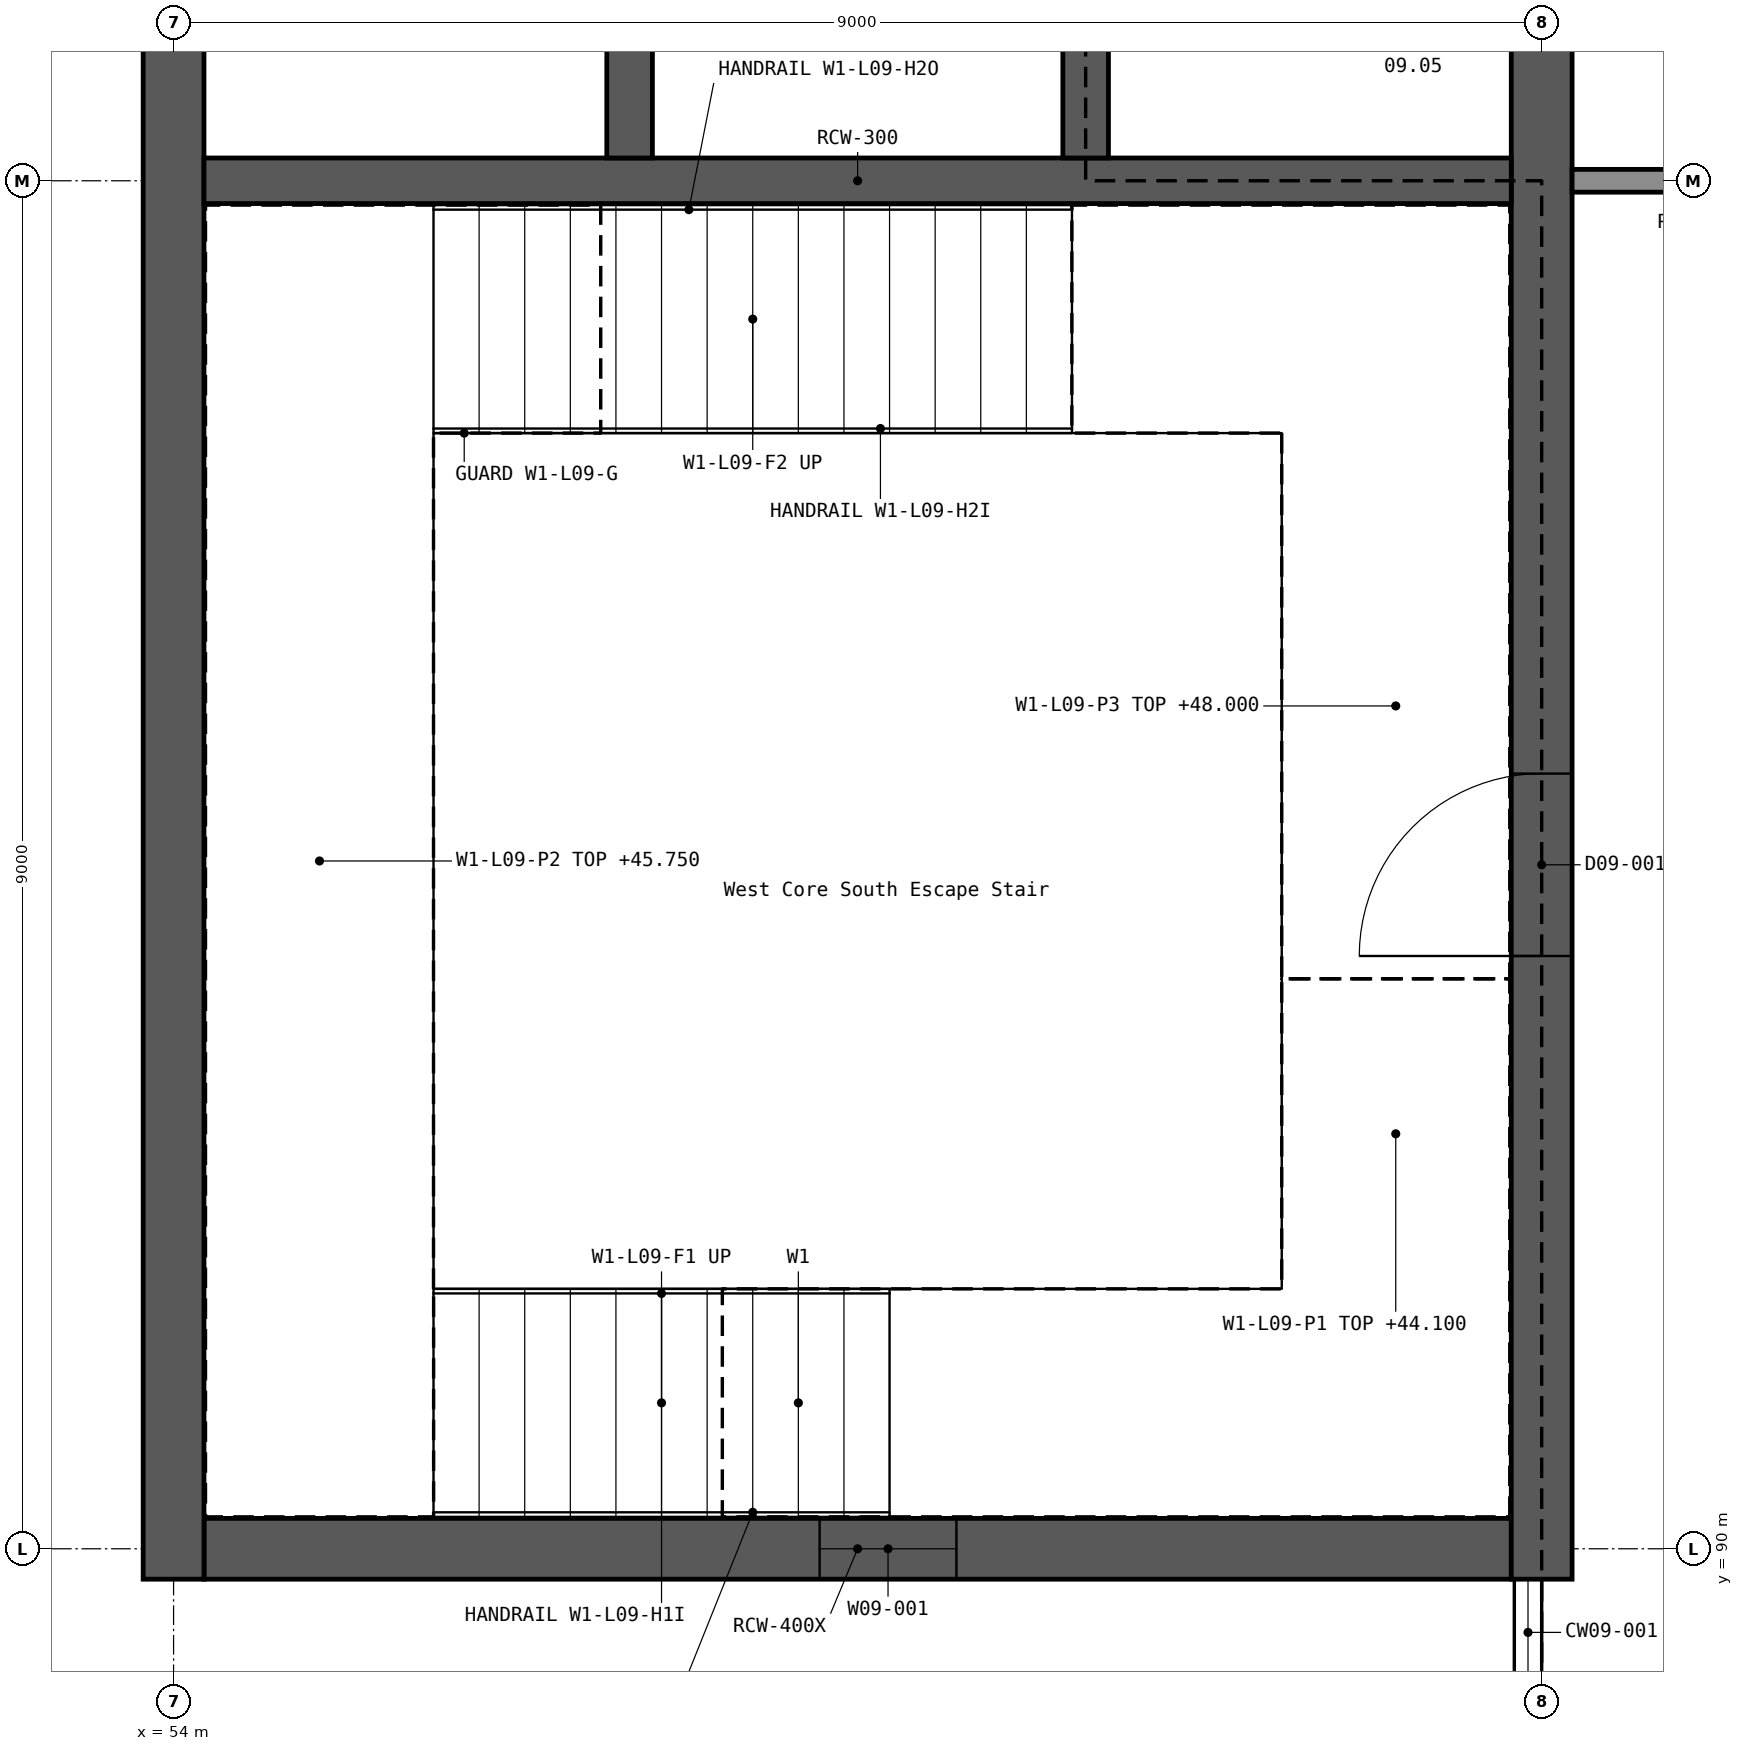
"""IFC4 building model, lengths in metres.
Left out: names, types, materials, properties, quantities, classifications, styles, units other than length and angle.
Written with IfcOpenShell. Run it as: python <this file> out.ifc"""

import sys

from ifc_helpers import new_model, si_unit, direction, frame, frame_2d, origin, place, context, subcontext, project, spatial, rectangle, extrude, element, fill, save


model = new_model("IFC4")
c1 = context("Model", 3, precision=1e-05, world=origin(), true_north=direction((0.0, 1.0)))
c2 = subcontext(c1, "Body", "Model", "MODEL_VIEW")
j1 = project(units=[si_unit("LENGTHUNIT", "METRE"), si_unit("PLANEANGLEUNIT", "RADIAN")], contexts=[c1])
p1 = place(None, origin())
s1 = spatial("IfcSite", under=j1, at=p1, CompositionType="ELEMENT")
p2 = place(p1, origin())
s2 = spatial("IfcBuilding", under=s1, at=p2, CompositionType="ELEMENT")
p3 = place(p2, frame((0.0, 0.0, 44.1)))
s3 = spatial("IfcBuildingStorey", under=s2, at=p3, CompositionType="ELEMENT", Elevation=44.1)
p4 = place(p3, frame((54.2, 90.0, 0.0), z_axis=(0.0, 0.0, 1.0), x_axis=(1.0, 0.0, 0.0)))
e1 = element("IfcWall", 1, at=p4, inside=s3, PredefinedType="SHEAR", context=c2, shape_type="SweptSolid", body=[
    extrude(rectangle(XDim=8.6, YDim=0.4, at=frame_2d((4.3, 0.0))), origin(), (0.0, 0.0, 1.0), 3.9),
])
p5 = place(p4, frame((4.05, 0.0, 1.2)))
e2 = element("IfcOpeningElement", 2, at=p5, cuts=e1, PredefinedType="OPENING", context=c2, shape_type="SweptSolid", body=[
    extrude(rectangle(XDim=0.9, YDim=1.5, at=frame_2d((0.45, 0.75))), frame((0.0, 0.211, 0.0), z_axis=(0.0, -1.0, 0.0), x_axis=(1.0, 0.0, 0.0)), (0.0, 0.0, 1.0), 0.422),
])
p6 = place(p3, frame((54.0, 89.8, 0.0), z_axis=(0.0, 0.0, 1.0), x_axis=(0.0, 1.0, 0.0)))
e3 = element("IfcWall", 3, at=p6, inside=s3, PredefinedType="SHEAR", context=c2, shape_type="SweptSolid", body=[
    extrude(rectangle(XDim=27.4, YDim=0.4, at=frame_2d((13.7, 0.0))), origin(), (0.0, 0.0, 1.0), 3.9),
])
p7 = place(p3, frame((63.0, 89.8, 0.0), z_axis=(0.0, 0.0, 1.0), x_axis=(0.0, 1.0, 0.0)))
e4 = element("IfcWall", 4, at=p7, inside=s3, PredefinedType="SHEAR", context=c2, shape_type="SweptSolid", body=[
    extrude(rectangle(XDim=27.4, YDim=0.4, at=frame_2d((13.7, 0.0))), origin(), (0.0, 0.0, 1.0), 3.9),
])
p8 = place(p7, frame((4.1, 0.0, 0.0)))
e5 = element("IfcOpeningElement", 5, at=p8, cuts=e4, PredefinedType="OPENING", context=c2, shape_type="SweptSolid", body=[
    extrude(rectangle(XDim=1.2, YDim=2.1, at=frame_2d((0.6, 1.05))), frame((0.0, 0.211, 0.0), z_axis=(0.0, -1.0, 0.0), x_axis=(1.0, 0.0, 0.0)), (0.0, 0.0, 1.0), 0.422),
])
p9 = place(p7, frame((22.1, 0.0, 0.0)))
e6 = element("IfcOpeningElement", 6, at=p9, cuts=e4, PredefinedType="OPENING", context=c2, shape_type="SweptSolid", body=[
    extrude(rectangle(XDim=1.2, YDim=2.1, at=frame_2d((0.6, 1.05))), frame((0.0, 0.211, 0.0), z_axis=(0.0, -1.0, 0.0), x_axis=(1.0, 0.0, 0.0)), (0.0, 0.0, 1.0), 0.422),
])
p10 = place(p7, frame((12.5, 0.0, 0.0)))
e7 = element("IfcOpeningElement", 7, at=p10, cuts=e4, PredefinedType="OPENING", context=c2, shape_type="SweptSolid", body=[
    extrude(rectangle(XDim=2.0, YDim=2.1, at=frame_2d((1.0, 1.05))), frame((0.0, 0.211, 0.0), z_axis=(0.0, -1.0, 0.0), x_axis=(1.0, 0.0, 0.0)), (0.0, 0.0, 1.0), 0.422),
])
p11 = place(p3, frame((54.2, 99.0, 0.0), z_axis=(0.0, 0.0, 1.0), x_axis=(1.0, 0.0, 0.0)))
e8 = element("IfcWall", 8, at=p11, inside=s3, PredefinedType="SHEAR", context=c2, shape_type="SweptSolid", body=[
    extrude(rectangle(XDim=8.6, YDim=0.3, at=frame_2d((4.3, 0.0))), origin(), (0.0, 0.0, 1.0), 3.9),
])
p12 = place(p3, frame((57.0, 99.15, 0.0), z_axis=(0.0, 0.0, 1.0), x_axis=(0.0, 1.0, 0.0)))
e9 = element("IfcWall", 9, at=p12, inside=s3, PredefinedType="SHEAR", context=c2, shape_type="SweptSolid", body=[
    extrude(rectangle(XDim=8.7, YDim=0.3, at=frame_2d((4.35, 0.0))), origin(), (0.0, 0.0, 1.0), 3.9),
])
p13 = place(p3, frame((60.0, 99.15, 0.0), z_axis=(0.0, 0.0, 1.0), x_axis=(0.0, 1.0, 0.0)))
e10 = element("IfcWall", 10, at=p13, inside=s3, PredefinedType="SHEAR", context=c2, shape_type="SweptSolid", body=[
    extrude(rectangle(XDim=8.7, YDim=0.3, at=frame_2d((4.35, 0.0))), origin(), (0.0, 0.0, 1.0), 3.9),
])
p14 = place(p13, frame((0.8, 0.0, 0.0)))
e11 = element("IfcOpeningElement", 11, at=p14, cuts=e10, PredefinedType="OPENING", context=c2, shape_type="SweptSolid", body=[
    extrude(rectangle(XDim=1.1, YDim=2.1, at=frame_2d((0.55, 1.05))), frame((0.0, 0.161, 0.0), z_axis=(0.0, -1.0, 0.0), x_axis=(1.0, 0.0, 0.0)), (0.0, 0.0, 1.0), 0.322),
])
p15 = place(p13, frame((3.8, 0.0, 0.0)))
e12 = element("IfcOpeningElement", 12, at=p15, cuts=e10, PredefinedType="OPENING", context=c2, shape_type="SweptSolid", body=[
    extrude(rectangle(XDim=1.1, YDim=2.1, at=frame_2d((0.55, 1.05))), frame((0.0, 0.161, 0.0), z_axis=(0.0, -1.0, 0.0), x_axis=(1.0, 0.0, 0.0)), (0.0, 0.0, 1.0), 0.322),
])
p16 = place(p13, frame((6.8, 0.0, 0.0)))
e13 = element("IfcOpeningElement", 13, at=p16, cuts=e10, PredefinedType="OPENING", context=c2, shape_type="SweptSolid", body=[
    extrude(rectangle(XDim=1.1, YDim=2.1, at=frame_2d((0.55, 1.05))), frame((0.0, 0.161, 0.0), z_axis=(0.0, -1.0, 0.0), x_axis=(1.0, 0.0, 0.0)), (0.0, 0.0, 1.0), 0.322),
])
p17 = place(p3, frame((63.2, 99.0, 0.0), z_axis=(0.0, 0.0, 1.0), x_axis=(1.0, 0.0, 0.0)))
e14 = element("IfcWall", 14, at=p17, inside=s3, PredefinedType="PARTITIONING", context=c2, shape_type="SweptSolid", body=[
    extrude(rectangle(XDim=2.8, YDim=0.15, at=frame_2d((1.4, 0.0))), origin(), (0.0, 0.0, 1.0), 3.22),
])
p18 = place(p17, frame((0.7, 0.0, 0.0)))
e15 = element("IfcOpeningElement", 15, at=p18, cuts=e14, PredefinedType="OPENING", context=c2, shape_type="SweptSolid", body=[
    extrude(rectangle(XDim=1.2, YDim=2.1, at=frame_2d((0.6, 1.05))), frame((0.0, 0.086, 0.0), z_axis=(0.0, -1.0, 0.0), x_axis=(1.0, 0.0, 0.0)), (0.0, 0.0, 1.0), 0.172),
])
p19 = place(p5, origin())
e16 = element("IfcWindow", 16, at=p19, inside=s3, PartitioningType="SINGLE_PANEL", PredefinedType="WINDOW", context=c2, shape_type="SweptSolid", body=[
    extrude(rectangle(XDim=0.9, YDim=1.5, at=frame_2d((0.45, 0.75))), frame((0.0, 0.03, 0.0), z_axis=(0.0, -1.0, 0.0), x_axis=(1.0, 0.0, 0.0)), (0.0, 0.0, 1.0), 0.06),
])
fill(e2, e16)
p20 = place(p8, origin())
e17 = element("IfcDoor", 17, at=p20, inside=s3, OperationType="SINGLE_SWING_LEFT", PredefinedType="DOOR", context=c2, shape_type="SweptSolid", body=[
    extrude(rectangle(XDim=1.2, YDim=2.1, at=frame_2d((0.6, 1.05))), frame((0.0, 0.025, 0.0), z_axis=(0.0, -1.0, 0.0), x_axis=(1.0, 0.0, 0.0)), (0.0, 0.0, 1.0), 0.05),
])
fill(e5, e17)
save(model, sys.argv[1])
